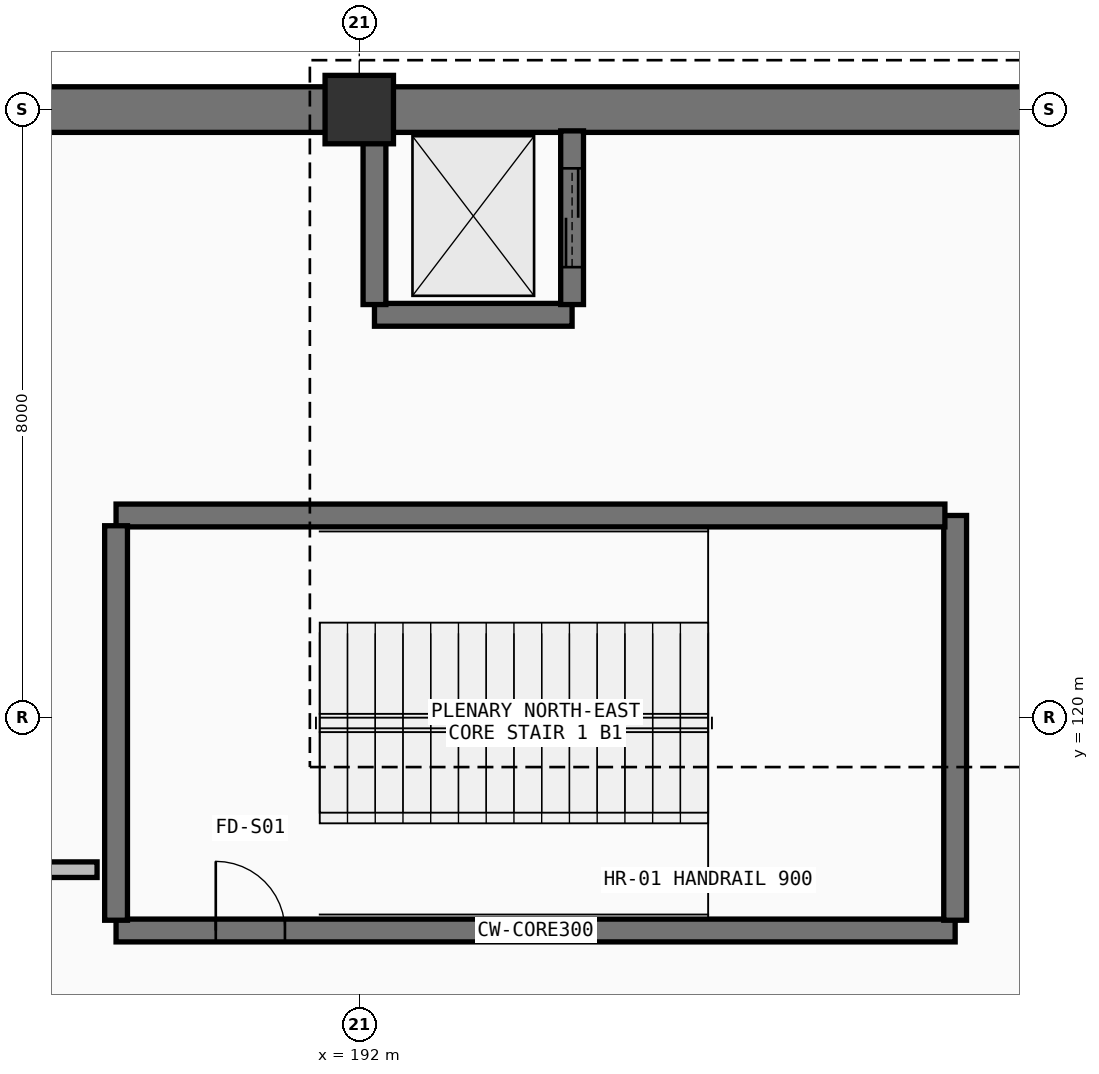
"""IFC4 building model, lengths in metres.
Left out: names, types, materials, properties, quantities, classifications, styles, units other than length and angle.
Written with IfcOpenShell. Run it as: python <this file> out.ifc"""

import sys

from ifc_helpers import new_model, si_unit, direction, frame, frame_2d, origin, origin_2d, place, context, subcontext, project, spatial, rectangle, extrude, element, fill, save


model = new_model("IFC4")
c1 = context("Model", 3, precision=1e-05, world=origin(), true_north=direction((0.0, 1.0)))
c2 = subcontext(c1, "Body", "Model", "MODEL_VIEW")
j1 = project(units=[si_unit("LENGTHUNIT", "METRE"), si_unit("PLANEANGLEUNIT", "RADIAN")], contexts=[c1])
p1 = place(None, origin())
s1 = spatial("IfcSite", under=j1, at=p1, CompositionType="ELEMENT")
p2 = place(p1, origin())
s2 = spatial("IfcBuilding", under=s1, at=p2, CompositionType="ELEMENT")
p3 = place(p2, frame((0.0, 0.0, -5.4)))
s3 = spatial("IfcBuildingStorey", under=s2, at=p3, CompositionType="ELEMENT", Elevation=-5.4)
p4 = place(p3, frame((192.0, 128.0, 0.0), z_axis=(0.0, 0.0, 1.0), x_axis=(1.0, 0.0, 0.0)))
e1 = element("IfcColumn", 1, at=p4, inside=s3, PredefinedType="COLUMN", context=c2, shape_type="SweptSolid", body=[
    extrude(rectangle(XDim=0.9, YDim=0.9, at=origin_2d()), origin(), (0.0, 0.0, 1.0), 5.4),
])
p5 = place(p3, frame((182.235, 128.0, 0.0), z_axis=(0.0, 0.0, 1.0), x_axis=(1.0, 0.0, 0.0)))
e2 = element("IfcWall", 2, at=p5, inside=s3, PredefinedType="SHEAR", context=c2, shape_type="SweptSolid", body=[
    extrude(rectangle(XDim=19.365, YDim=0.6, at=frame_2d((9.683, 0.0))), origin(), (0.0, 0.0, 1.0), 5.06),
])
p6 = place(p3, frame((188.8, 117.2, 0.0), z_axis=(0.0, 0.0, 1.0), x_axis=(1.0, 0.0, 0.0)))
e3 = element("IfcWall", 3, at=p6, inside=s3, PredefinedType="SHEAR", context=c2, shape_type="SweptSolid", body=[
    extrude(rectangle(XDim=11.04, YDim=0.3, at=frame_2d((5.52, 0.0))), origin(), (0.0, 0.0, 1.0), 5.06),
])
p7 = place(p6, frame((1.312, 0.0, 0.0)))
e4 = element("IfcOpeningElement", 4, at=p7, cuts=e3, PredefinedType="OPENING", context=c2, shape_type="SweptSolid", body=[
    extrude(rectangle(XDim=0.91, YDim=2.08, at=frame_2d((0.455, 1.04))), frame((0.0, 0.16, 0.0), z_axis=(0.0, -1.0, 0.0), x_axis=(1.0, 0.0, 0.0)), (0.0, 0.0, 1.0), 0.32),
])
p8 = place(p3, frame((199.84, 117.335, 0.0), z_axis=(0.0, 0.0, 1.0), x_axis=(0.0, 1.0, 0.0)))
e5 = element("IfcWall", 5, at=p8, inside=s3, PredefinedType="SHEAR", context=c2, shape_type="SweptSolid", body=[
    extrude(rectangle(XDim=5.325, YDim=0.3, at=frame_2d((2.663, 0.0))), origin(), (0.0, 0.0, 1.0), 5.06),
])
p9 = place(p3, frame((199.705, 122.66, 0.0), z_axis=(0.0, 0.0, 1.0), x_axis=(-1.0, 0.0, 0.0)))
e6 = element("IfcWall", 6, at=p9, inside=s3, PredefinedType="SHEAR", context=c2, shape_type="SweptSolid", body=[
    extrude(rectangle(XDim=10.905, YDim=0.3, at=frame_2d((5.453, 0.0))), origin(), (0.0, 0.0, 1.0), 5.06),
])
p10 = place(p3, frame((188.8, 122.525, 0.0), z_axis=(0.0, 0.0, 1.0), x_axis=(0.0, -1.0, 0.0)))
e7 = element("IfcWall", 7, at=p10, inside=s3, PredefinedType="SHEAR", context=c2, shape_type="SweptSolid", body=[
    extrude(rectangle(XDim=5.19, YDim=0.3, at=frame_2d((2.595, 0.0))), origin(), (0.0, 0.0, 1.0), 5.06),
])
p11 = place(p3, frame((192.2, 125.3, 0.0), z_axis=(0.0, 0.0, 1.0), x_axis=(1.0, 0.0, 0.0)))
e8 = element("IfcWall", 8, at=p11, inside=s3, PredefinedType="SHEAR", context=c2, shape_type="SweptSolid", body=[
    extrude(rectangle(XDim=2.6, YDim=0.3, at=frame_2d((1.3, 0.0))), origin(), (0.0, 0.0, 1.0), 5.06),
])
p12 = place(p3, frame((194.8, 125.435, 0.0), z_axis=(0.0, 0.0, 1.0), x_axis=(0.0, 1.0, 0.0)))
e9 = element("IfcWall", 9, at=p12, inside=s3, PredefinedType="SHEAR", context=c2, shape_type="SweptSolid", body=[
    extrude(rectangle(XDim=2.285, YDim=0.3, at=frame_2d((1.143, 0.0))), origin(), (0.0, 0.0, 1.0), 5.06),
])
p13 = place(p12, frame((0.492, 0.0, 0.0)))
e10 = element("IfcOpeningElement", 10, at=p13, cuts=e9, PredefinedType="OPENING", context=c2, shape_type="SweptSolid", body=[
    extrude(rectangle(XDim=1.3, YDim=2.22, at=frame_2d((0.65, 1.11))), frame((0.0, 0.16, 0.0), z_axis=(0.0, -1.0, 0.0), x_axis=(1.0, 0.0, 0.0)), (0.0, 0.0, 1.0), 0.32),
])
p14 = place(p3, frame((192.2, 127.72, 0.0), z_axis=(0.0, 0.0, 1.0), x_axis=(0.0, -1.0, 0.0)))
e11 = element("IfcWall", 11, at=p14, inside=s3, PredefinedType="SHEAR", context=c2, shape_type="SweptSolid", body=[
    extrude(rectangle(XDim=2.285, YDim=0.3, at=frame_2d((1.143, 0.0))), origin(), (0.0, 0.0, 1.0), 5.06),
])
p15 = place(p3, frame((188.55, 118.0, 0.0), z_axis=(0.0, 0.0, 1.0), x_axis=(-1.0, 0.0, 0.0)))
e12 = element("IfcWall", 12, at=p15, inside=s3, PredefinedType="SOLIDWALL", context=c2, shape_type="SweptSolid", body=[
    extrude(rectangle(XDim=6.15, YDim=0.205, at=frame_2d((3.075, 0.0))), origin(), (0.0, 0.0, 1.0), 4.43),
])
p16 = place(p7, origin())
e13 = element("IfcDoor", 13, at=p16, inside=s3, OperationType="SINGLE_SWING_RIGHT", PredefinedType="DOOR", context=c2, shape_type="SweptSolid", body=[
    extrude(rectangle(XDim=0.91, YDim=2.08, at=frame_2d((0.455, 1.04))), frame((0.0, 0.025, 0.0), z_axis=(0.0, -1.0, 0.0), x_axis=(1.0, 0.0, 0.0)), (0.0, 0.0, 1.0), 0.05),
])
fill(e4, e13)
p17 = place(p13, origin())
e14 = element("IfcDoor", 14, at=p17, inside=s3, OperationType="DOUBLE_DOOR_SLIDING", PredefinedType="DOOR", context=c2, shape_type="SweptSolid", body=[
    extrude(rectangle(XDim=1.3, YDim=2.22, at=frame_2d((0.65, 1.11))), frame((0.0, 0.025, 0.0), z_axis=(0.0, -1.0, 0.0), x_axis=(1.0, 0.0, 0.0)), (0.0, 0.0, 1.0), 0.05),
])
fill(e10, e14)
save(model, sys.argv[1])
